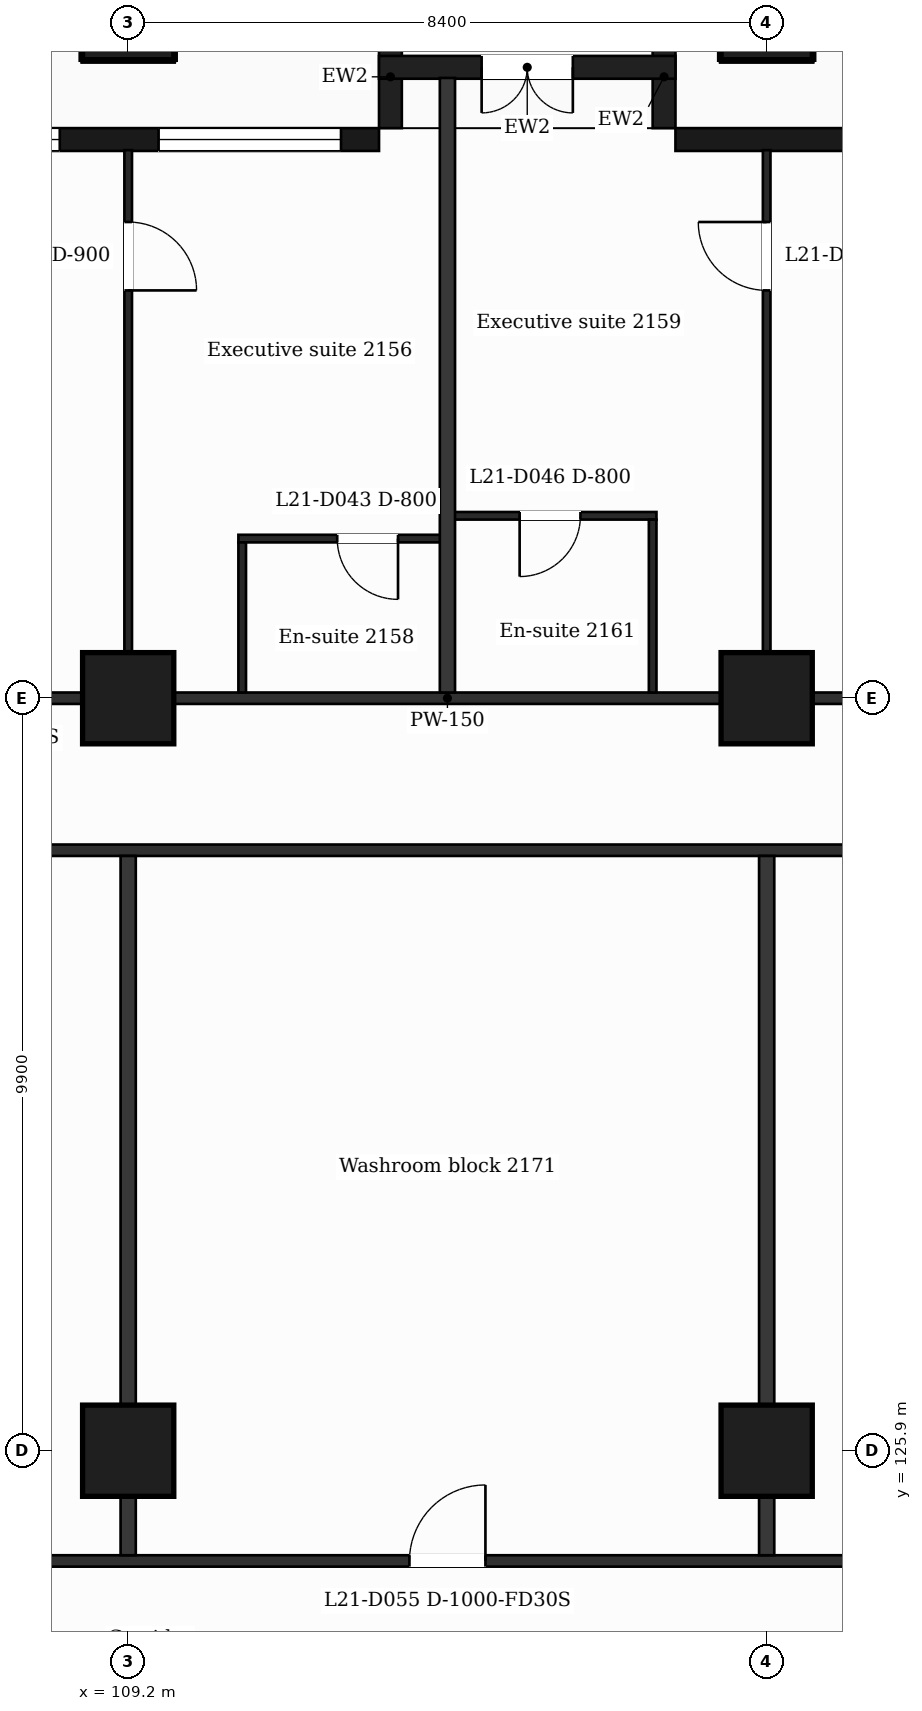
"""IFC4 building model, lengths in metres.
Left out: names, types, materials, properties, quantities, classifications, styles, units other than length and angle.
Written with IfcOpenShell. Run it as: python <this file> out.ifc"""

import sys

from ifc_helpers import new_model, si_unit, direction, frame, frame_2d, origin, origin_2d, place, context, subcontext, project, spatial, rectangle, extrude, element, fill, save


model = new_model("IFC4")
c1 = context("Model", 3, precision=1e-05, world=origin(), true_north=direction((0.0, 1.0)))
c2 = subcontext(c1, "Body", "Model", "MODEL_VIEW")
j1 = project(units=[si_unit("LENGTHUNIT", "METRE"), si_unit("PLANEANGLEUNIT", "RADIAN")], contexts=[c1])
p1 = place(None, origin())
s1 = spatial("IfcSite", under=j1, at=p1, CompositionType="ELEMENT")
p2 = place(p1, origin())
s2 = spatial("IfcBuilding", under=s1, at=p2, CompositionType="ELEMENT")
p3 = place(p2, frame((0.0, 0.0, 94.7)))
s3 = spatial("IfcBuildingStorey", under=s2, at=p3, CompositionType="ELEMENT", Elevation=94.7)
for number, where, z_axis, x_axis in (
    (1, (109.2, 125.9, 0.0), (0.0, 0.0, 1.0), (1.0, 0.0, 0.0)),
    (2, (117.6, 125.9, 0.0), (0.0, 0.0, 1.0), (1.0, 0.0, 0.0)),
    (3, (109.2, 135.8, 0.0), (0.0, 0.0, 1.0), (1.0, 0.0, 0.0)),
    (4, (117.6, 135.8, 0.0), (0.0, 0.0, 1.0), (1.0, 0.0, 0.0)),
    (5, (109.2, 144.8, 0.0), (0.0, 0.0, 1.0), (1.0, 0.0, 0.0)),
    (6, (117.6, 144.8, 0.0), (0.0, 0.0, 1.0), (1.0, 0.0, 0.0)),
):
    element("IfcColumn", number, at=place(p3, frame(where, z_axis=z_axis, x_axis=x_axis)), inside=s3, PredefinedType="COLUMN", context=c2, shape_type="SweptSolid", body=[
        extrude(rectangle(XDim=1.2, YDim=1.2, at=origin_2d()), origin(), (0.0, 0.0, 1.0), 3.7),
    ])
p4 = place(p3, frame((130.65, 143.15, 0.0), z_axis=(0.0, 0.0, 1.0), x_axis=(-1.0, 0.0, 0.0)))
e7 = element("IfcWall", 7, at=p4, inside=s3, PredefinedType="SOLIDWALL", context=c2, shape_type="SweptSolid", body=[
    extrude(rectangle(XDim=14.25, YDim=0.3, at=frame_2d((7.125, 0.0))), origin(), (0.0, 0.0, 1.0), 3.38),
])
p5 = place(p4, frame((1.35, 0.0, 0.9)))
e8 = element("IfcOpeningElement", 8, at=p5, cuts=e7, PredefinedType="OPENING", context=c2, shape_type="SweptSolid", body=[
    extrude(rectangle(XDim=2.4, YDim=2.1, at=frame_2d((1.2, 1.05))), frame((0.0, 0.16, 0.0), z_axis=(0.0, -1.0, 0.0), x_axis=(1.0, 0.0, 0.0)), (0.0, 0.0, 1.0), 0.32),
])
p6 = place(p4, frame((6.15, 0.0, 0.0)))
e9 = element("IfcOpeningElement", 9, at=p6, cuts=e7, PredefinedType="OPENING", context=c2, shape_type="SweptSolid", body=[
    extrude(rectangle(XDim=1.2, YDim=2.4, at=frame_2d((0.6, 1.2))), frame((0.0, 0.16, 0.0), z_axis=(0.0, -1.0, 0.0), x_axis=(1.0, 0.0, 0.0)), (0.0, 0.0, 1.0), 0.32),
])
p7 = place(p4, frame((10.35, 0.0, 0.9)))
e10 = element("IfcOpeningElement", 10, at=p7, cuts=e7, PredefinedType="OPENING", context=c2, shape_type="SweptSolid", body=[
    extrude(rectangle(XDim=1.2, YDim=2.1, at=frame_2d((0.6, 1.05))), frame((0.0, 0.16, 0.0), z_axis=(0.0, -1.0, 0.0), x_axis=(1.0, 0.0, 0.0)), (0.0, 0.0, 1.0), 0.32),
])
p8 = place(p3, frame((112.5, 143.15, 0.0), z_axis=(0.0, 0.0, 1.0), x_axis=(-1.0, 0.0, 0.0)))
e11 = element("IfcWall", 11, at=p8, inside=s3, PredefinedType="SOLIDWALL", context=c2, shape_type="SweptSolid", body=[
    extrude(rectangle(XDim=16.5, YDim=0.3, at=frame_2d((8.25, 0.0))), origin(), (0.0, 0.0, 1.0), 3.38),
])
p9 = place(p8, frame((0.5, 0.0, 0.9)))
e12 = element("IfcOpeningElement", 12, at=p9, cuts=e11, PredefinedType="OPENING", context=c2, shape_type="SweptSolid", body=[
    extrude(rectangle(XDim=2.4, YDim=2.1, at=frame_2d((1.2, 1.05))), frame((0.0, 0.16, 0.0), z_axis=(0.0, -1.0, 0.0), x_axis=(1.0, 0.0, 0.0)), (0.0, 0.0, 1.0), 0.32),
])
p10 = place(p8, frame((4.2, 0.0, 0.9)))
e13 = element("IfcOpeningElement", 13, at=p10, cuts=e11, PredefinedType="OPENING", context=c2, shape_type="SweptSolid", body=[
    extrude(rectangle(XDim=2.4, YDim=2.1, at=frame_2d((1.2, 1.05))), frame((0.0, 0.16, 0.0), z_axis=(0.0, -1.0, 0.0), x_axis=(1.0, 0.0, 0.0)), (0.0, 0.0, 1.0), 0.32),
])
p11 = place(p8, frame((9.0, 0.0, 0.0)))
e14 = element("IfcOpeningElement", 14, at=p11, cuts=e11, PredefinedType="OPENING", context=c2, shape_type="SweptSolid", body=[
    extrude(rectangle(XDim=1.2, YDim=2.4, at=frame_2d((0.6, 1.2))), frame((0.0, 0.16, 0.0), z_axis=(0.0, -1.0, 0.0), x_axis=(1.0, 0.0, 0.0)), (0.0, 0.0, 1.0), 0.32),
])
p12 = place(p8, frame((12.6, 0.0, 0.9)))
e15 = element("IfcOpeningElement", 15, at=p12, cuts=e11, PredefinedType="OPENING", context=c2, shape_type="SweptSolid", body=[
    extrude(rectangle(XDim=2.4, YDim=2.1, at=frame_2d((1.2, 1.05))), frame((0.0, 0.16, 0.0), z_axis=(0.0, -1.0, 0.0), x_axis=(1.0, 0.0, 0.0)), (0.0, 0.0, 1.0), 0.32),
])
for number, where, z_axis, x_axis in (
    (16, (116.25, 143.3, 0.0), (0.0, 0.0, 1.0), (0.0, 1.0, 0.0)),
    (17, (112.65, 143.3, 0.0), (0.0, 0.0, 1.0), (0.0, 1.0, 0.0)),
):
    element("IfcWall", number, at=place(p3, frame(where, z_axis=z_axis, x_axis=x_axis)), inside=s3, PredefinedType="SOLIDWALL", context=c2, shape_type="SweptSolid", body=[
        extrude(rectangle(XDim=1.35, YDim=0.3, at=frame_2d((0.675, 0.0))), origin(), (0.0, 0.0, 1.0), 3.38),
    ])
p13 = place(p3, frame((116.4, 144.1, 0.0), z_axis=(0.0, 0.0, 1.0), x_axis=(-1.0, 0.0, 0.0)))
e18 = element("IfcWall", 18, at=p13, inside=s3, PredefinedType="SOLIDWALL", context=c2, shape_type="SweptSolid", body=[
    extrude(rectangle(XDim=3.9, YDim=0.3, at=frame_2d((1.95, 0.0))), origin(), (0.0, 0.0, 1.0), 3.38),
])
p14 = place(p13, frame((1.35, 0.0, 0.0)))
e19 = element("IfcOpeningElement", 19, at=p14, cuts=e18, PredefinedType="OPENING", context=c2, shape_type="SweptSolid", body=[
    extrude(rectangle(XDim=1.2, YDim=2.4, at=frame_2d((0.6, 1.2))), frame((0.0, 0.16, 0.0), z_axis=(0.0, -1.0, 0.0), x_axis=(1.0, 0.0, 0.0)), (0.0, 0.0, 1.0), 0.32),
])
p15 = place(p3, frame((100.8, 124.45, 0.0), z_axis=(0.0, 0.0, 1.0), x_axis=(1.0, 0.0, 0.0)))
e20 = element("IfcWall", 20, at=p15, inside=s3, PredefinedType="PARTITIONING", context=c2, shape_type="SweptSolid", body=[
    extrude(rectangle(XDim=25.2, YDim=0.15, at=frame_2d((12.6, 0.0))), origin(), (0.0, 0.0, 1.0), 3.38),
])
p16 = place(p15, frame((4.275, 0.0, 0.0)))
e21 = element("IfcOpeningElement", 21, at=p16, cuts=e20, PredefinedType="OPENING", context=c2, shape_type="SweptSolid", body=[
    extrude(rectangle(XDim=1.0, YDim=2.1, at=frame_2d((0.5, 1.05))), frame((0.0, 0.085, 0.0), z_axis=(0.0, -1.0, 0.0), x_axis=(1.0, 0.0, 0.0)), (0.0, 0.0, 1.0), 0.17),
])
p17 = place(p15, frame((1.0, 0.0, 0.0)))
e22 = element("IfcOpeningElement", 22, at=p17, cuts=e20, PredefinedType="OPENING", context=c2, shape_type="SweptSolid", body=[
    extrude(rectangle(XDim=1.0, YDim=2.1, at=frame_2d((0.5, 1.05))), frame((0.0, 0.085, 0.0), z_axis=(0.0, -1.0, 0.0), x_axis=(1.0, 0.0, 0.0)), (0.0, 0.0, 1.0), 0.17),
])
p18 = place(p15, frame((12.1, 0.0, 0.0)))
e23 = element("IfcOpeningElement", 23, at=p18, cuts=e20, PredefinedType="OPENING", context=c2, shape_type="SweptSolid", body=[
    extrude(rectangle(XDim=1.0, YDim=2.1, at=frame_2d((0.5, 1.05))), frame((0.0, 0.085, 0.0), z_axis=(0.0, -1.0, 0.0), x_axis=(1.0, 0.0, 0.0)), (0.0, 0.0, 1.0), 0.17),
])
p19 = place(p15, frame((19.83, 0.0, 0.0)))
e24 = element("IfcOpeningElement", 24, at=p19, cuts=e20, PredefinedType="OPENING", context=c2, shape_type="SweptSolid", body=[
    extrude(rectangle(XDim=1.0, YDim=2.1, at=frame_2d((0.5, 1.05))), frame((0.0, 0.085, 0.0), z_axis=(0.0, -1.0, 0.0), x_axis=(1.0, 0.0, 0.0)), (0.0, 0.0, 1.0), 0.17),
])
p20 = place(p3, frame((100.725, 133.8, 0.0), z_axis=(0.0, 0.0, 1.0), x_axis=(1.0, 0.0, 0.0)))
e25 = element("IfcWall", 25, at=p20, inside=s3, PredefinedType="PARTITIONING", context=c2, shape_type="SweptSolid", body=[
    extrude(rectangle(XDim=25.35, YDim=0.15, at=frame_2d((12.675, 0.0))), origin(), (0.0, 0.0, 1.0), 3.38),
])
p21 = place(p3, frame((90.895, 135.8, 0.0), z_axis=(0.0, 0.0, 1.0), x_axis=(1.0, 0.0, 0.0)))
e26 = element("IfcWall", 26, at=p21, inside=s3, PredefinedType="PARTITIONING", context=c2, shape_type="SweptSolid", body=[
    extrude(rectangle(XDim=45.011, YDim=0.15, at=frame_2d((22.505, 0.0))), origin(), (0.0, 0.0, 1.0), 3.38),
])
p22 = place(p21, frame((7.675, 0.0, 0.0)))
e27 = element("IfcOpeningElement", 27, at=p22, cuts=e26, PredefinedType="OPENING", context=c2, shape_type="SweptSolid", body=[
    extrude(rectangle(XDim=1.0, YDim=2.1, at=frame_2d((0.5, 1.05))), frame((0.0, 0.085, 0.0), z_axis=(0.0, -1.0, 0.0), x_axis=(1.0, 0.0, 0.0)), (0.0, 0.0, 1.0), 0.17),
])
p23 = place(p21, frame((15.281, 0.0, 0.0)))
e28 = element("IfcOpeningElement", 28, at=p23, cuts=e26, PredefinedType="OPENING", context=c2, shape_type="SweptSolid", body=[
    extrude(rectangle(XDim=1.0, YDim=2.1, at=frame_2d((0.5, 1.05))), frame((0.0, 0.085, 0.0), z_axis=(0.0, -1.0, 0.0), x_axis=(1.0, 0.0, 0.0)), (0.0, 0.0, 1.0), 0.17),
])
p24 = place(p21, frame((29.735, 0.0, 0.0)))
e29 = element("IfcOpeningElement", 29, at=p24, cuts=e26, PredefinedType="OPENING", context=c2, shape_type="SweptSolid", body=[
    extrude(rectangle(XDim=1.0, YDim=2.1, at=frame_2d((0.5, 1.05))), frame((0.0, 0.085, 0.0), z_axis=(0.0, -1.0, 0.0), x_axis=(1.0, 0.0, 0.0)), (0.0, 0.0, 1.0), 0.17),
])
p25 = place(p21, frame((36.005, 0.0, 0.0)))
e30 = element("IfcOpeningElement", 30, at=p25, cuts=e26, PredefinedType="OPENING", context=c2, shape_type="SweptSolid", body=[
    extrude(rectangle(XDim=1.0, YDim=2.1, at=frame_2d((0.5, 1.05))), frame((0.0, 0.085, 0.0), z_axis=(0.0, -1.0, 0.0), x_axis=(1.0, 0.0, 0.0)), (0.0, 0.0, 1.0), 0.17),
])
p26 = place(p3, frame((110.65, 137.9, 0.0), z_axis=(0.0, 0.0, 1.0), x_axis=(1.0, 0.0, 0.0)))
e31 = element("IfcWall", 31, at=p26, inside=s3, PredefinedType="PARTITIONING", context=c2, shape_type="SweptSolid", body=[
    extrude(rectangle(XDim=2.75, YDim=0.1, at=frame_2d((1.375, 0.0))), origin(), (0.0, 0.0, 1.0), 3.38),
])
p27 = place(p26, frame((1.3, 0.0, 0.0)))
e32 = element("IfcOpeningElement", 32, at=p27, cuts=e31, PredefinedType="OPENING", context=c2, shape_type="SweptSolid", body=[
    extrude(rectangle(XDim=0.8, YDim=2.1, at=frame_2d((0.4, 1.05))), frame((0.0, 0.06, 0.0), z_axis=(0.0, -1.0, 0.0), x_axis=(1.0, 0.0, 0.0)), (0.0, 0.0, 1.0), 0.12),
])
p28 = place(p3, frame((113.4, 138.2, 0.0), z_axis=(0.0, 0.0, 1.0), x_axis=(1.0, 0.0, 0.0)))
e33 = element("IfcWall", 33, at=p28, inside=s3, PredefinedType="PARTITIONING", context=c2, shape_type="SweptSolid", body=[
    extrude(rectangle(XDim=2.75, YDim=0.1, at=frame_2d((1.375, 0.0))), origin(), (0.0, 0.0, 1.0), 3.38),
])
p29 = place(p28, frame((0.95, 0.0, 0.0)))
e34 = element("IfcOpeningElement", 34, at=p29, cuts=e33, PredefinedType="OPENING", context=c2, shape_type="SweptSolid", body=[
    extrude(rectangle(XDim=0.8, YDim=2.1, at=frame_2d((0.4, 1.05))), frame((0.0, 0.06, 0.0), z_axis=(0.0, -1.0, 0.0), x_axis=(1.0, 0.0, 0.0)), (0.0, 0.0, 1.0), 0.12),
])
p30 = place(p3, frame((109.2, 135.875, 0.0), z_axis=(0.0, 0.0, 1.0), x_axis=(0.0, 1.0, 0.0)))
e35 = element("IfcWall", 35, at=p30, inside=s3, PredefinedType="PARTITIONING", context=c2, shape_type="SweptSolid", body=[
    extrude(rectangle(XDim=7.135, YDim=0.1, at=frame_2d((3.567, 0.0))), origin(), (0.0, 0.0, 1.0), 3.38),
])
p31 = place(p30, frame((5.29, 0.0, 0.0)))
e36 = element("IfcOpeningElement", 36, at=p31, cuts=e35, PredefinedType="OPENING", context=c2, shape_type="SweptSolid", body=[
    extrude(rectangle(XDim=0.9, YDim=2.1, at=frame_2d((0.45, 1.05))), frame((0.0, 0.06, 0.0), z_axis=(0.0, -1.0, 0.0), x_axis=(1.0, 0.0, 0.0)), (0.0, 0.0, 1.0), 0.12),
])
p32 = place(p3, frame((109.2, 124.525, 0.0), z_axis=(0.0, 0.0, 1.0), x_axis=(0.0, 1.0, 0.0)))
e37 = element("IfcWall", 37, at=p32, inside=s3, PredefinedType="PARTITIONING", context=c2, shape_type="SweptSolid", body=[
    extrude(rectangle(XDim=9.2, YDim=0.2, at=frame_2d((4.6, 0.0))), origin(), (0.0, 0.0, 1.0), 3.38),
])
p33 = place(p3, frame((110.7, 135.875, 0.0), z_axis=(0.0, 0.0, 1.0), x_axis=(0.0, 1.0, 0.0)))
e38 = element("IfcWall", 38, at=p33, inside=s3, PredefinedType="PARTITIONING", context=c2, shape_type="SweptSolid", body=[
    extrude(rectangle(XDim=1.975, YDim=0.1, at=frame_2d((0.988, 0.0))), origin(), (0.0, 0.0, 1.0), 3.38),
])
p34 = place(p3, frame((113.4, 135.875, 0.0), z_axis=(0.0, 0.0, 1.0), x_axis=(0.0, 1.0, 0.0)))
e39 = element("IfcWall", 39, at=p34, inside=s3, PredefinedType="PARTITIONING", context=c2, shape_type="SweptSolid", body=[
    extrude(rectangle(XDim=8.085, YDim=0.2, at=frame_2d((4.042, 0.0))), origin(), (0.0, 0.0, 1.0), 3.38),
])
p35 = place(p3, frame((116.1, 135.875, 0.0), z_axis=(0.0, 0.0, 1.0), x_axis=(0.0, 1.0, 0.0)))
e40 = element("IfcWall", 40, at=p35, inside=s3, PredefinedType="PARTITIONING", context=c2, shape_type="SweptSolid", body=[
    extrude(rectangle(XDim=2.275, YDim=0.1, at=frame_2d((1.137, 0.0))), origin(), (0.0, 0.0, 1.0), 3.38),
])
p36 = place(p3, frame((117.6, 135.875, 0.0), z_axis=(0.0, 0.0, 1.0), x_axis=(0.0, 1.0, 0.0)))
e41 = element("IfcWall", 41, at=p36, inside=s3, PredefinedType="PARTITIONING", context=c2, shape_type="SweptSolid", body=[
    extrude(rectangle(XDim=7.135, YDim=0.1, at=frame_2d((3.567, 0.0))), origin(), (0.0, 0.0, 1.0), 3.38),
])
p37 = place(p36, frame((5.29, 0.0, 0.0)))
e42 = element("IfcOpeningElement", 42, at=p37, cuts=e41, PredefinedType="OPENING", context=c2, shape_type="SweptSolid", body=[
    extrude(rectangle(XDim=0.9, YDim=2.1, at=frame_2d((0.45, 1.05))), frame((0.0, 0.06, 0.0), z_axis=(0.0, -1.0, 0.0), x_axis=(1.0, 0.0, 0.0)), (0.0, 0.0, 1.0), 0.12),
])
p38 = place(p3, frame((117.6, 124.525, 0.0), z_axis=(0.0, 0.0, 1.0), x_axis=(0.0, 1.0, 0.0)))
e43 = element("IfcWall", 43, at=p38, inside=s3, PredefinedType="PARTITIONING", context=c2, shape_type="SweptSolid", body=[
    extrude(rectangle(XDim=9.2, YDim=0.2, at=frame_2d((4.6, 0.0))), origin(), (0.0, 0.0, 1.0), 3.38),
])
p39 = place(p9, origin())
e44 = element("IfcWindow", 44, at=p39, inside=s3, PartitioningType="SINGLE_PANEL", PredefinedType="WINDOW", context=c2, shape_type="SweptSolid", body=[
    extrude(rectangle(XDim=2.4, YDim=2.1, at=frame_2d((1.2, 1.05))), frame((0.0, 0.03, 0.0), z_axis=(0.0, -1.0, 0.0), x_axis=(1.0, 0.0, 0.0)), (0.0, 0.0, 1.0), 0.06),
])
fill(e12, e44)
p40 = place(p10, origin())
e45 = element("IfcWindow", 45, at=p40, inside=s3, PartitioningType="SINGLE_PANEL", PredefinedType="WINDOW", context=c2, shape_type="SweptSolid", body=[
    extrude(rectangle(XDim=2.4, YDim=2.1, at=frame_2d((1.2, 1.05))), frame((0.0, 0.03, 0.0), z_axis=(0.0, -1.0, 0.0), x_axis=(1.0, 0.0, 0.0)), (0.0, 0.0, 1.0), 0.06),
])
fill(e13, e45)
p41 = place(p14, origin())
e46 = element("IfcDoor", 46, at=p41, inside=s3, OperationType="DOUBLE_DOOR_SINGLE_SWING", PredefinedType="DOOR", context=c2, shape_type="SweptSolid", body=[
    extrude(rectangle(XDim=1.2, YDim=2.4, at=frame_2d((0.6, 1.2))), frame((0.0, 0.025, 0.0), z_axis=(0.0, -1.0, 0.0), x_axis=(1.0, 0.0, 0.0)), (0.0, 0.0, 1.0), 0.05),
])
fill(e19, e46)
p42 = place(p31, origin())
e47 = element("IfcDoor", 47, at=p42, inside=s3, OperationType="SINGLE_SWING_LEFT", PredefinedType="DOOR", context=c2, shape_type="SweptSolid", body=[
    extrude(rectangle(XDim=0.9, YDim=2.1, at=frame_2d((0.45, 1.05))), frame((0.0, 0.025, 0.0), z_axis=(0.0, -1.0, 0.0), x_axis=(1.0, 0.0, 0.0)), (0.0, 0.0, 1.0), 0.05),
])
fill(e36, e47)
p43 = place(p27, origin())
e48 = element("IfcDoor", 48, at=p43, inside=s3, OperationType="SINGLE_SWING_RIGHT", PredefinedType="DOOR", context=c2, shape_type="SweptSolid", body=[
    extrude(rectangle(XDim=0.8, YDim=2.1, at=frame_2d((0.4, 1.05))), frame((0.0, 0.025, 0.0), z_axis=(0.0, -1.0, 0.0), x_axis=(1.0, 0.0, 0.0)), (0.0, 0.0, 1.0), 0.05),
])
fill(e32, e48)
p44 = place(p37, origin())
e49 = element("IfcDoor", 49, at=p44, inside=s3, OperationType="SINGLE_SWING_RIGHT", PredefinedType="DOOR", context=c2, shape_type="SweptSolid", body=[
    extrude(rectangle(XDim=0.9, YDim=2.1, at=frame_2d((0.45, 1.05))), frame((0.0, 0.025, 0.0), z_axis=(0.0, -1.0, 0.0), x_axis=(1.0, 0.0, 0.0)), (0.0, 0.0, 1.0), 0.05),
])
fill(e42, e49)
p45 = place(p29, origin())
e50 = element("IfcDoor", 50, at=p45, inside=s3, OperationType="SINGLE_SWING_LEFT", PredefinedType="DOOR", context=c2, shape_type="SweptSolid", body=[
    extrude(rectangle(XDim=0.8, YDim=2.1, at=frame_2d((0.4, 1.05))), frame((0.0, 0.025, 0.0), z_axis=(0.0, -1.0, 0.0), x_axis=(1.0, 0.0, 0.0)), (0.0, 0.0, 1.0), 0.05),
])
fill(e34, e50)
p46 = place(p18, origin())
e51 = element("IfcDoor", 51, at=p46, inside=s3, OperationType="SINGLE_SWING_RIGHT", PredefinedType="DOOR", context=c2, shape_type="SweptSolid", body=[
    extrude(rectangle(XDim=1.0, YDim=2.1, at=frame_2d((0.5, 1.05))), frame((0.0, 0.025, 0.0), z_axis=(0.0, -1.0, 0.0), x_axis=(1.0, 0.0, 0.0)), (0.0, 0.0, 1.0), 0.05),
])
fill(e23, e51)
save(model, sys.argv[1])
